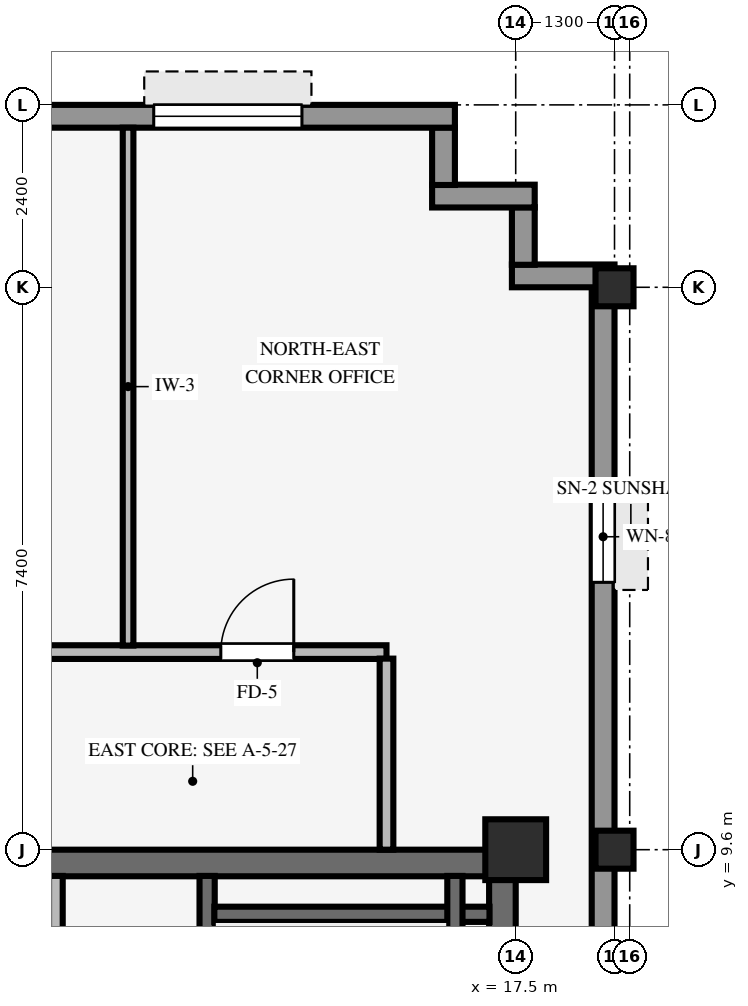
"""IFC4 building model, lengths in metres.
Left out: names, types, materials, properties, quantities, classifications, styles, units other than length and angle.
Written with IfcOpenShell. Run it as: python <this file> out.ifc"""

import sys

from ifc_helpers import new_model, si_unit, direction, frame, frame_2d, origin, origin_2d, place, context, subcontext, project, spatial, rectangle, hollow_rectangle, extrude, source, transform, mapped, element, fill, save


model = new_model("IFC4")
c1 = context("Model", 3, precision=1e-05, world=origin(), true_north=direction((0.0, 1.0)))
c2 = subcontext(c1, "Body", "Model", "MODEL_VIEW")
j1 = project(units=[si_unit("LENGTHUNIT", "METRE"), si_unit("PLANEANGLEUNIT", "RADIAN")], contexts=[c1])
p1 = place(None, origin())
s1 = spatial("IfcSite", under=j1, at=p1, CompositionType="ELEMENT")
p2 = place(p1, origin())
s2 = spatial("IfcBuilding", under=s1, at=p2, CompositionType="ELEMENT")
p3 = place(p2, frame((0.0, 0.0, 231.05)))
s3 = spatial("IfcBuildingStorey", under=s2, at=p3, CompositionType="ELEMENT", Elevation=231.05)
p4 = place(p3, frame((9.0, 9.425, 0.0), z_axis=(0.0, 0.0, 1.0), x_axis=(1.0, 0.0, 0.0)))
e1 = element("IfcWall", 1, at=p4, inside=s3, PredefinedType="SHEAR", context=c2, shape_type="SweptSolid", body=[
    extrude(rectangle(XDim=8.5, YDim=0.35, at=frame_2d((4.25, 0.0))), origin(), (0.0, 0.0, 1.0), 3.37),
])
p5 = place(p3, frame((17.325, -9.255, 0.0), z_axis=(0.0, 0.0, 1.0), x_axis=(0.0, 1.0, 0.0)))
e2 = element("IfcWall", 2, at=p5, inside=s3, PredefinedType="SHEAR", context=c2, shape_type="SweptSolid", body=[
    extrude(rectangle(XDim=18.51, YDim=0.35, at=frame_2d((9.255, 0.0))), origin(), (0.0, 0.0, 1.0), 3.37),
])
p6 = place(p3, frame((17.5, 9.6, 0.0), z_axis=(0.0, 0.0, 1.0), x_axis=(1.0, 0.0, 0.0)))
e3 = element("IfcColumn", 3, at=p6, inside=s3, PredefinedType="COLUMN", context=c2, shape_type="SweptSolid", body=[
    extrude(rectangle(XDim=0.8, YDim=0.8, at=origin_2d()), origin(), (0.0, 0.0, 1.0), 3.37),
])
for number, where, z_axis, x_axis in (
    (4, (18.8, 9.6, 0.0), (0.0, 0.0, 1.0), (1.0, 0.0, 0.0)),
    (5, (18.8, 17.0, 0.0), (0.0, 0.0, 1.0), (1.0, 0.0, 0.0)),
):
    element("IfcColumn", number, at=place(p3, frame(where, z_axis=z_axis, x_axis=x_axis)), inside=s3, PredefinedType="COLUMN", context=c2, shape_type="SweptSolid", body=[
        extrude(hollow_rectangle(XDim=0.5, YDim=0.5, WallThickness=0.032, InnerFilletRadius=0.032, OuterFilletRadius=0.064, at=origin_2d()), origin(), (0.0, 0.0, 1.0), 3.37),
    ])
p7 = place(p3, frame((18.65, -17.004, 0.0), z_axis=(0.0, 0.0, 1.0), x_axis=(0.0, 1.0, 0.0)))
e6 = element("IfcWall", 6, at=p7, inside=s3, PredefinedType="STANDARD", context=c2, shape_type="SweptSolid", body=[
    extrude(rectangle(XDim=34.008, YDim=0.3, at=frame_2d((17.004, 0.0))), origin(), (0.0, 0.0, 1.0), 2.705),
])
p8 = place(p7, frame((2.686, 0.0, 0.8)))
e7 = element("IfcOpeningElement", 7, at=p8, cuts=e6, PredefinedType="OPENING", context=c2, shape_type="SweptSolid", body=[
    extrude(rectangle(XDim=1.2, YDim=1.48, at=frame_2d((0.6, 0.74))), frame((0.0, 0.16, 0.0), z_axis=(0.0, -1.0, 0.0), x_axis=(1.0, 0.0, 0.0)), (0.0, 0.0, 1.0), 0.32),
])
p9 = place(p7, frame((30.122, 0.0, 0.8)))
e8 = element("IfcOpeningElement", 8, at=p9, cuts=e6, PredefinedType="OPENING", context=c2, shape_type="SweptSolid", body=[
    extrude(rectangle(XDim=1.2, YDim=1.48, at=frame_2d((0.6, 0.74))), frame((0.0, 0.16, 0.0), z_axis=(0.0, -1.0, 0.0), x_axis=(1.0, 0.0, 0.0)), (0.0, 0.0, 1.0), 0.32),
])
p10 = place(p3, frame((17.45, 17.15, 0.0), z_axis=(0.0, 0.0, 1.0), x_axis=(1.0, 0.0, 0.0)))
e9 = element("IfcWall", 9, at=p10, inside=s3, PredefinedType="STANDARD", context=c2, shape_type="SweptSolid", body=[
    extrude(rectangle(XDim=1.35, YDim=0.3, at=frame_2d((0.675, 0.0))), origin(), (0.0, 0.0, 1.0), 2.892),
])
p11 = place(p3, frame((17.6, 17.296, 0.0), z_axis=(0.0, 0.0, 1.0), x_axis=(0.0, 1.0, 0.0)))
e10 = element("IfcWall", 10, at=p11, inside=s3, PredefinedType="STANDARD", context=c2, shape_type="SweptSolid", body=[
    extrude(rectangle(XDim=0.758, YDim=0.3, at=frame_2d((0.379, 0.0))), origin(), (0.0, 0.0, 1.0), 2.892),
])
p12 = place(p3, frame((16.4, 18.2, 0.0), z_axis=(0.0, 0.0, 1.0), x_axis=(1.0, 0.0, 0.0)))
e11 = element("IfcWall", 11, at=p12, inside=s3, PredefinedType="STANDARD", context=c2, shape_type="SweptSolid", body=[
    extrude(rectangle(XDim=1.35, YDim=0.3, at=frame_2d((0.675, 0.0))), origin(), (0.0, 0.0, 1.0), 2.892),
])
p13 = place(p3, frame((16.55, 18.346, 0.0), z_axis=(0.0, 0.0, 1.0), x_axis=(0.0, 1.0, 0.0)))
e12 = element("IfcWall", 12, at=p13, inside=s3, PredefinedType="STANDARD", context=c2, shape_type="SweptSolid", body=[
    extrude(rectangle(XDim=0.758, YDim=0.3, at=frame_2d((0.379, 0.0))), origin(), (0.0, 0.0, 1.0), 2.892),
])
p14 = place(p3, frame((-24.3, 19.25, 0.0), z_axis=(0.0, 0.0, 1.0), x_axis=(1.0, 0.0, 0.0)))
e13 = element("IfcWall", 13, at=p14, inside=s3, PredefinedType="STANDARD", context=c2, shape_type="SweptSolid", body=[
    extrude(rectangle(XDim=41.0, YDim=0.3, at=frame_2d((20.5, 0.0))), origin(), (0.0, 0.0, 1.0), 2.705),
])
p15 = place(p14, frame((19.0, 0.0, 0.0)))
e14 = element("IfcOpeningElement", 14, at=p15, cuts=e13, PredefinedType="OPENING", context=c2, shape_type="SweptSolid", body=[
    extrude(rectangle(XDim=0.98, YDim=2.15, at=frame_2d((0.49, 1.075))), frame((0.0, 0.16, 0.0), z_axis=(0.0, -1.0, 0.0), x_axis=(1.0, 0.0, 0.0)), (0.0, 0.0, 1.0), 0.32),
])
p16 = place(p14, frame((2.462, 0.0, 0.8)))
e15 = element("IfcOpeningElement", 15, at=p16, cuts=e13, PredefinedType="OPENING", context=c2, shape_type="SweptSolid", body=[
    extrude(rectangle(XDim=1.95, YDim=1.48, at=frame_2d((0.975, 0.74))), frame((0.0, 0.16, 0.0), z_axis=(0.0, -1.0, 0.0), x_axis=(1.0, 0.0, 0.0)), (0.0, 0.0, 1.0), 0.32),
])
p17 = place(p14, frame((7.337, 0.0, 0.8)))
e16 = element("IfcOpeningElement", 16, at=p17, cuts=e13, PredefinedType="OPENING", context=c2, shape_type="SweptSolid", body=[
    extrude(rectangle(XDim=1.95, YDim=1.48, at=frame_2d((0.975, 0.74))), frame((0.0, 0.16, 0.0), z_axis=(0.0, -1.0, 0.0), x_axis=(1.0, 0.0, 0.0)), (0.0, 0.0, 1.0), 0.32),
])
p18 = place(p14, frame((21.512, 0.0, 0.8)))
e17 = element("IfcOpeningElement", 17, at=p18, cuts=e13, PredefinedType="OPENING", context=c2, shape_type="SweptSolid", body=[
    extrude(rectangle(XDim=1.95, YDim=1.48, at=frame_2d((0.975, 0.74))), frame((0.0, 0.16, 0.0), z_axis=(0.0, -1.0, 0.0), x_axis=(1.0, 0.0, 0.0)), (0.0, 0.0, 1.0), 0.32),
])
p19 = place(p14, frame((26.837, 0.0, 0.8)))
e18 = element("IfcOpeningElement", 18, at=p19, cuts=e13, PredefinedType="OPENING", context=c2, shape_type="SweptSolid", body=[
    extrude(rectangle(XDim=1.95, YDim=1.48, at=frame_2d((0.975, 0.74))), frame((0.0, 0.16, 0.0), z_axis=(0.0, -1.0, 0.0), x_axis=(1.0, 0.0, 0.0)), (0.0, 0.0, 1.0), 0.32),
])
p20 = place(p14, frame((37.038, 0.0, 0.8)))
e19 = element("IfcOpeningElement", 19, at=p20, cuts=e13, PredefinedType="OPENING", context=c2, shape_type="SweptSolid", body=[
    extrude(rectangle(XDim=1.95, YDim=1.48, at=frame_2d((0.975, 0.74))), frame((0.0, 0.16, 0.0), z_axis=(0.0, -1.0, 0.0), x_axis=(1.0, 0.0, 0.0)), (0.0, 0.0, 1.0), 0.32),
])
p21 = place(p3, frame((13.44, 0.9, 0.0), z_axis=(0.0, 0.0, 1.0), x_axis=(0.0, 1.0, 0.0)))
e20 = element("IfcWall", 20, at=p21, inside=s3, PredefinedType="SHEAR", context=c2, shape_type="SweptSolid", body=[
    extrude(rectangle(XDim=8.355, YDim=0.2, at=frame_2d((4.177, 0.0))), origin(), (0.0, 0.0, 1.0), 3.37),
])
p22 = place(p21, frame((0.43, 0.0, 0.0)))
e21 = element("IfcOpeningElement", 21, at=p22, cuts=e20, PredefinedType="OPENING", context=c2, shape_type="SweptSolid", body=[
    extrude(rectangle(XDim=1.1, YDim=2.15, at=frame_2d((0.55, 1.075))), frame((0.0, 0.11, 0.0), z_axis=(0.0, -1.0, 0.0), x_axis=(1.0, 0.0, 0.0)), (0.0, 0.0, 1.0), 0.22),
])
p23 = place(p3, frame((13.535, 8.75, 0.0), z_axis=(0.0, 0.0, 1.0), x_axis=(1.0, 0.0, 0.0)))
e22 = element("IfcWall", 22, at=p23, inside=s3, PredefinedType="SHEAR", context=c2, shape_type="SweptSolid", body=[
    extrude(rectangle(XDim=3.62, YDim=0.2, at=frame_2d((1.81, 0.0))), origin(), (0.0, 0.0, 1.0), 3.37),
])
p24 = place(p3, frame((16.7, 1.095, 0.0), z_axis=(0.0, 0.0, 1.0), x_axis=(0.0, 1.0, 0.0)))
e23 = element("IfcWall", 23, at=p24, inside=s3, PredefinedType="SHEAR", context=c2, shape_type="SweptSolid", body=[
    extrude(rectangle(XDim=8.16, YDim=0.2, at=frame_2d((4.08, 0.0))), origin(), (0.0, 0.0, 1.0), 3.37),
])
p25 = place(p3, frame((11.45, 1.49, 0.0), z_axis=(0.0, 0.0, 1.0), x_axis=(0.0, 1.0, 0.0)))
e24 = element("IfcWall", 24, at=p25, inside=s3, PredefinedType="PARTITIONING", context=c2, shape_type="SweptSolid", body=[
    extrude(rectangle(XDim=7.765, YDim=0.18, at=frame_2d((3.882, 0.0))), origin(), (0.0, 0.0, 1.0), 3.36),
])
p26 = place(p3, frame((-15.0, 12.2, 0.0), z_axis=(0.0, 0.0, 1.0), x_axis=(1.0, 0.0, 0.0)))
e25 = element("IfcWall", 25, at=p26, inside=s3, PredefinedType="PARTITIONING", context=c2, shape_type="SweptSolid", body=[
    extrude(rectangle(XDim=30.8, YDim=0.18, at=frame_2d((15.4, 0.0))), origin(), (0.0, 0.0, 1.0), 3.36),
])
p27 = place(p26, frame((11.52, 0.0, 0.0)))
e26 = element("IfcOpeningElement", 26, at=p27, cuts=e25, PredefinedType="OPENING", context=c2, shape_type="SweptSolid", body=[
    extrude(rectangle(XDim=0.96, YDim=2.1, at=frame_2d((0.48, 1.05))), frame((0.0, 0.1, 0.0), z_axis=(0.0, -1.0, 0.0), x_axis=(1.0, 0.0, 0.0)), (0.0, 0.0, 1.0), 0.2),
])
p28 = place(p26, frame((25.22, 0.0, 0.0)))
e27 = element("IfcOpeningElement", 27, at=p28, cuts=e25, PredefinedType="OPENING", context=c2, shape_type="SweptSolid", body=[
    extrude(rectangle(XDim=0.96, YDim=2.1, at=frame_2d((0.48, 1.05))), frame((0.0, 0.1, 0.0), z_axis=(0.0, -1.0, 0.0), x_axis=(1.0, 0.0, 0.0)), (0.0, 0.0, 1.0), 0.2),
])
p29 = place(p26, frame((28.62, 0.0, 0.0)))
e28 = element("IfcOpeningElement", 28, at=p29, cuts=e25, PredefinedType="OPENING", context=c2, shape_type="SweptSolid", body=[
    extrude(rectangle(XDim=0.96, YDim=2.1, at=frame_2d((0.48, 1.05))), frame((0.0, 0.1, 0.0), z_axis=(0.0, -1.0, 0.0), x_axis=(1.0, 0.0, 0.0)), (0.0, 0.0, 1.0), 0.2),
])
p30 = place(p26, frame((3.92, 0.0, 0.0)))
e29 = element("IfcOpeningElement", 29, at=p30, cuts=e25, PredefinedType="OPENING", context=c2, shape_type="SweptSolid", body=[
    extrude(rectangle(XDim=0.96, YDim=2.1, at=frame_2d((0.48, 1.05))), frame((0.0, 0.1, 0.0), z_axis=(0.0, -1.0, 0.0), x_axis=(1.0, 0.0, 0.0)), (0.0, 0.0, 1.0), 0.2),
])
p31 = place(p26, frame((16.2, 0.0, 0.0)))
e30 = element("IfcOpeningElement", 30, at=p31, cuts=e25, PredefinedType="OPENING", context=c2, shape_type="SweptSolid", body=[
    extrude(rectangle(XDim=0.9, YDim=2.1, at=frame_2d((0.45, 1.05))), frame((0.0, 0.1, 0.0), z_axis=(0.0, -1.0, 0.0), x_axis=(1.0, 0.0, 0.0)), (0.0, 0.0, 1.0), 0.2),
])
p32 = place(p26, frame((18.3, 0.0, 0.0)))
e31 = element("IfcOpeningElement", 31, at=p32, cuts=e25, PredefinedType="OPENING", context=c2, shape_type="SweptSolid", body=[
    extrude(rectangle(XDim=0.9, YDim=2.1, at=frame_2d((0.45, 1.05))), frame((0.0, 0.1, 0.0), z_axis=(0.0, -1.0, 0.0), x_axis=(1.0, 0.0, 0.0)), (0.0, 0.0, 1.0), 0.2),
])
p33 = place(p26, frame((20.25, 0.0, 0.0)))
e32 = element("IfcOpeningElement", 32, at=p33, cuts=e25, PredefinedType="OPENING", context=c2, shape_type="SweptSolid", body=[
    extrude(rectangle(XDim=0.9, YDim=2.1, at=frame_2d((0.45, 1.05))), frame((0.0, 0.1, 0.0), z_axis=(0.0, -1.0, 0.0), x_axis=(1.0, 0.0, 0.0)), (0.0, 0.0, 1.0), 0.2),
])
p34 = place(p3, frame((12.4, 12.286, 0.0), z_axis=(0.0, 0.0, 1.0), x_axis=(0.0, 1.0, 0.0)))
e33 = element("IfcWall", 33, at=p34, inside=s3, PredefinedType="PARTITIONING", context=c2, shape_type="SweptSolid", body=[
    extrude(rectangle(XDim=6.814, YDim=0.14, at=frame_2d((3.407, 0.0))), origin(), (0.0, 0.0, 1.0), 3.36),
])
p35 = place(p3, frame((15.8, 9.6, 0.0), z_axis=(0.0, 0.0, 1.0), x_axis=(0.0, 1.0, 0.0)))
e34 = element("IfcWall", 34, at=p35, inside=s3, PredefinedType="PARTITIONING", context=c2, shape_type="SweptSolid", body=[
    extrude(rectangle(XDim=2.514, YDim=0.18, at=frame_2d((1.257, 0.0))), origin(), (0.0, 0.0, 1.0), 3.36),
])
m1 = source(origin(), c2, "Body", "SweptSolid", [
    extrude(rectangle(XDim=1.2, YDim=1.48, at=frame_2d((0.6, 0.74))), frame((0.0, 0.03, 0.0), z_axis=(0.0, -1.0, 0.0), x_axis=(1.0, 0.0, 0.0)), (0.0, 0.0, 1.0), 0.06),
])
p36 = place(p9, origin())
e35 = element("IfcWindow", 35, at=p36, inside=s3, PartitioningType="SINGLE_PANEL", PredefinedType="WINDOW", context=c2, shape_type="MappedRepresentation", body=[
    mapped(m1, transform((0.0, 0.0, 0.0), scale=1.0)),
])
fill(e8, e35)
m2 = source(origin(), c2, "Body", "SweptSolid", [
    extrude(rectangle(XDim=1.95, YDim=1.48, at=frame_2d((0.975, 0.74))), frame((0.0, 0.03, 0.0), z_axis=(0.0, -1.0, 0.0), x_axis=(1.0, 0.0, 0.0)), (0.0, 0.0, 1.0), 0.06),
])
p37 = place(p20, origin())
e36 = element("IfcWindow", 36, at=p37, inside=s3, PartitioningType="SINGLE_PANEL", PredefinedType="WINDOW", context=c2, shape_type="MappedRepresentation", body=[
    mapped(m2, transform((0.0, 0.0, 0.0), scale=1.0)),
])
fill(e19, e36)
m3 = source(origin(), c2, "Body", "SweptSolid", [
    extrude(rectangle(XDim=0.96, YDim=2.1, at=frame_2d((0.48, 1.05))), frame((0.0, 0.025, 0.0), z_axis=(0.0, -1.0, 0.0), x_axis=(1.0, 0.0, 0.0)), (0.0, 0.0, 1.0), 0.05),
])
p38 = place(p29, origin())
e37 = element("IfcDoor", 37, at=p38, inside=s3, OperationType="SINGLE_SWING_RIGHT", PredefinedType="DOOR", context=c2, shape_type="MappedRepresentation", body=[
    mapped(m3, transform((0.0, 0.0, 0.0), scale=1.0)),
])
fill(e28, e37)
save(model, sys.argv[1])
